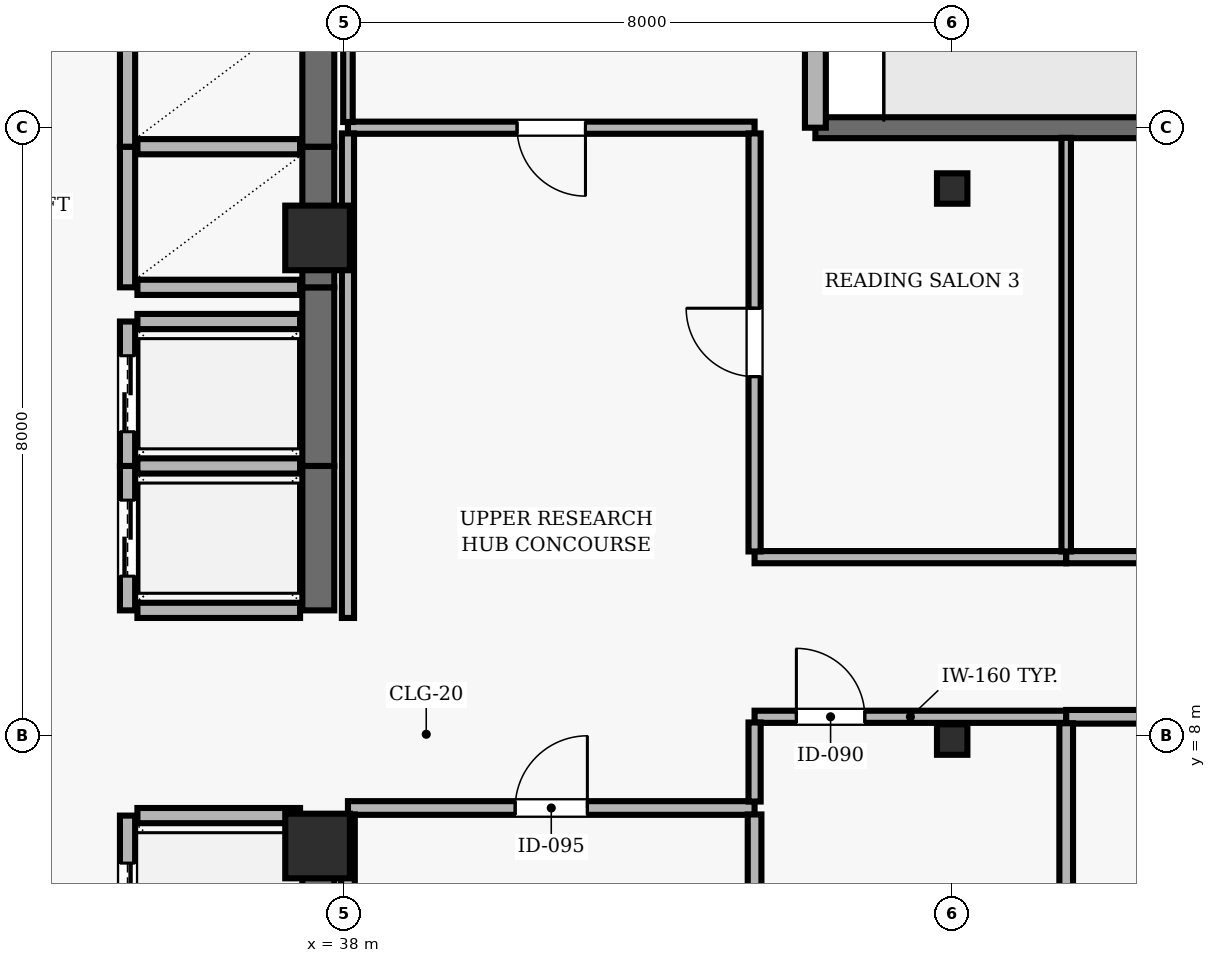
"""IFC4 building model, lengths in metres.
Left out: names, types, materials, properties, quantities, classifications, styles, units other than length and angle.
Written with IfcOpenShell. Run it as: python <this file> out.ifc"""

import sys

from ifc_helpers import new_model, si_unit, direction, frame, frame_2d, origin, origin_2d, place, context, subcontext, project, spatial, rectangle, hollow_rectangle, extrude, element, fill, save


model = new_model("IFC4")
c1 = context("Model", 3, precision=1e-05, world=origin(), true_north=direction((0.0, 1.0)))
c2 = subcontext(c1, "Body", "Model", "MODEL_VIEW")
j1 = project(units=[si_unit("LENGTHUNIT", "METRE"), si_unit("PLANEANGLEUNIT", "RADIAN")], contexts=[c1])
p1 = place(None, origin())
s1 = spatial("IfcSite", under=j1, at=p1, CompositionType="ELEMENT")
p2 = place(p1, origin())
s2 = spatial("IfcBuilding", under=s1, at=p2, CompositionType="ELEMENT")
p3 = place(p2, frame((0.0, 0.0, 275.5)))
s3 = spatial("IfcBuildingStorey", under=s2, at=p3, CompositionType="ELEMENT", Elevation=275.5)
for number, where, z_axis, x_axis in (
    (1, (37.65, 6.55, 0.0), (0.0, 0.0, 1.0), (1.0, 0.0, 0.0)),
    (2, (37.65, 14.55, 0.0), (0.0, 0.0, 1.0), (1.0, 0.0, 0.0)),
):
    element("IfcColumn", number, at=place(p3, frame(where, z_axis=z_axis, x_axis=x_axis)), inside=s3, PredefinedType="COLUMN", context=c2, shape_type="SweptSolid", body=[
        extrude(rectangle(XDim=0.85, YDim=0.85, at=origin_2d()), origin(), (0.0, 0.0, 1.0), 3.9),
    ])
for number, where, z_axis, x_axis in (
    (3, (46.0, 7.95, 0.0), (0.0, 0.0, 1.0), (1.0, 0.0, 0.0)),
    (4, (46.0, 15.2, 0.0), (0.0, 0.0, 1.0), (1.0, 0.0, 0.0)),
):
    element("IfcColumn", number, at=place(p3, frame(where, z_axis=z_axis, x_axis=x_axis)), inside=s3, PredefinedType="COLUMN", context=c2, shape_type="SweptSolid", body=[
        extrude(hollow_rectangle(XDim=0.4, YDim=0.4, WallThickness=0.02, at=origin_2d()), origin(), (0.0, 0.0, 1.0), 3.9),
    ])
p4 = place(p3, frame((57.3, 16.0, 0.0), z_axis=(0.0, 0.0, 1.0), x_axis=(-1.0, 0.0, 0.0)))
e5 = element("IfcWall", 5, at=p4, inside=s3, PredefinedType="SOLIDWALL", context=c2, shape_type="SweptSolid", body=[
    extrude(rectangle(XDim=13.1, YDim=0.275, at=frame_2d((6.55, 0.0))), origin(), (0.0, 0.0, 1.0), 3.69),
])
p5 = place(p4, frame((7.05, 0.0, 0.0)))
e6 = element("IfcOpeningElement", 6, at=p5, cuts=e5, PredefinedType="OPENING", context=c2, shape_type="SweptSolid", body=[
    extrude(rectangle(XDim=1.0, YDim=2.2, at=frame_2d((0.5, 1.1))), frame((0.0, 0.147, 0.0), z_axis=(0.0, -1.0, 0.0), x_axis=(1.0, 0.0, 0.0)), (0.0, 0.0, 1.0), 0.295),
])
p6 = place(p3, frame((44.2, 16.0, 0.0), z_axis=(0.0, 0.0, 1.0), x_axis=(0.0, 1.0, 0.0)))
e7 = element("IfcWall", 7, at=p6, inside=s3, PredefinedType="SOLIDWALL", context=c2, shape_type="SweptSolid", body=[
    extrude(rectangle(XDim=5.4, YDim=0.275, at=frame_2d((2.7, 0.0))), origin(), (0.0, 0.0, 1.0), 3.69),
])
p7 = place(p6, frame((2.1, 0.0, 0.9)))
e8 = element("IfcOpeningElement", 8, at=p7, cuts=e7, PredefinedType="OPENING", context=c2, shape_type="SweptSolid", body=[
    extrude(rectangle(XDim=1.2, YDim=1.6, at=frame_2d((0.6, 0.8))), frame((0.0, 0.147, 0.0), z_axis=(0.0, -1.0, 0.0), x_axis=(1.0, 0.0, 0.0)), (0.0, 0.0, 1.0), 0.295),
])
p8 = place(p3, frame((35.15, 6.95, 0.0), z_axis=(0.0, 0.0, 1.0), x_axis=(0.0, -1.0, 0.0)))
e9 = element("IfcWall", 9, at=p8, inside=s3, PredefinedType="SOLIDWALL", context=c2, shape_type="SweptSolid", body=[
    extrude(rectangle(XDim=2.25, YDim=0.2, at=frame_2d((1.125, 0.0))), origin(), (0.0, 0.0, 1.0), 3.69),
])
p9 = place(p8, frame((0.625, 0.0, 0.0)))
e10 = element("IfcOpeningElement", 10, at=p9, cuts=e9, PredefinedType="OPENING", context=c2, shape_type="SweptSolid", body=[
    extrude(rectangle(XDim=1.0, YDim=2.1, at=frame_2d((0.5, 1.05))), frame((0.0, 0.11, 0.0), z_axis=(0.0, -1.0, 0.0), x_axis=(1.0, 0.0, 0.0)), (0.0, 0.0, 1.0), 0.22),
])
p10 = place(p3, frame((37.66, 4.7, 0.0), z_axis=(0.0, 0.0, 1.0), x_axis=(0.0, 1.0, 0.0)))
e11 = element("IfcWall", 11, at=p10, inside=s3, PredefinedType="SHEAR", context=c2, shape_type="SweptSolid", body=[
    extrude(rectangle(XDim=2.25, YDim=0.42, at=frame_2d((1.125, 0.0))), origin(), (0.0, 0.0, 1.0), 3.69),
])
p11 = place(p3, frame((37.42, 6.95, 0.0), z_axis=(0.0, 0.0, 1.0), x_axis=(-1.0, 0.0, 0.0)))
e12 = element("IfcWall", 12, at=p11, inside=s3, PredefinedType="SOLIDWALL", context=c2, shape_type="SweptSolid", body=[
    extrude(rectangle(XDim=2.14, YDim=0.2, at=frame_2d((1.07, 0.0))), origin(), (0.0, 0.0, 1.0), 3.69),
])
p12 = place(p3, frame((35.15, 11.55, 0.0), z_axis=(0.0, 0.0, 1.0), x_axis=(0.0, -1.0, 0.0)))
e13 = element("IfcWall", 13, at=p12, inside=s3, PredefinedType="SOLIDWALL", context=c2, shape_type="SweptSolid", body=[
    extrude(rectangle(XDim=1.9, YDim=0.2, at=frame_2d((0.95, 0.0))), origin(), (0.0, 0.0, 1.0), 3.69),
])
p13 = place(p12, frame((0.45, 0.0, 0.0)))
e14 = element("IfcOpeningElement", 14, at=p13, cuts=e13, PredefinedType="OPENING", context=c2, shape_type="SweptSolid", body=[
    extrude(rectangle(XDim=1.0, YDim=2.1, at=frame_2d((0.5, 1.05))), frame((0.0, 0.11, 0.0), z_axis=(0.0, -1.0, 0.0), x_axis=(1.0, 0.0, 0.0)), (0.0, 0.0, 1.0), 0.22),
])
p14 = place(p3, frame((37.66, 9.65, 0.0), z_axis=(0.0, 0.0, 1.0), x_axis=(0.0, 1.0, 0.0)))
e15 = element("IfcWall", 15, at=p14, inside=s3, PredefinedType="SHEAR", context=c2, shape_type="SweptSolid", body=[
    extrude(rectangle(XDim=1.9, YDim=0.42, at=frame_2d((0.95, 0.0))), origin(), (0.0, 0.0, 1.0), 3.69),
])
for number, where, z_axis, x_axis in (
    (16, (35.28, 9.65, 0.0), (0.0, 0.0, 1.0), (1.0, 0.0, 0.0)),
    (17, (37.42, 11.55, 0.0), (0.0, 0.0, 1.0), (-1.0, 0.0, 0.0)),
):
    element("IfcWall", number, at=place(p3, frame(where, z_axis=z_axis, x_axis=x_axis)), inside=s3, PredefinedType="SOLIDWALL", context=c2, shape_type="SweptSolid", body=[
        extrude(rectangle(XDim=2.14, YDim=0.2, at=frame_2d((1.07, 0.0))), origin(), (0.0, 0.0, 1.0), 3.69),
    ])
p15 = place(p3, frame((35.15, 13.45, 0.0), z_axis=(0.0, 0.0, 1.0), x_axis=(0.0, -1.0, 0.0)))
e18 = element("IfcWall", 18, at=p15, inside=s3, PredefinedType="SOLIDWALL", context=c2, shape_type="SweptSolid", body=[
    extrude(rectangle(XDim=1.9, YDim=0.2, at=frame_2d((0.95, 0.0))), origin(), (0.0, 0.0, 1.0), 3.69),
])
p16 = place(p15, frame((0.45, 0.0, 0.0)))
e19 = element("IfcOpeningElement", 19, at=p16, cuts=e18, PredefinedType="OPENING", context=c2, shape_type="SweptSolid", body=[
    extrude(rectangle(XDim=1.0, YDim=2.1, at=frame_2d((0.5, 1.05))), frame((0.0, 0.11, 0.0), z_axis=(0.0, -1.0, 0.0), x_axis=(1.0, 0.0, 0.0)), (0.0, 0.0, 1.0), 0.22),
])
p17 = place(p3, frame((37.66, 11.55, 0.0), z_axis=(0.0, 0.0, 1.0), x_axis=(0.0, 1.0, 0.0)))
e20 = element("IfcWall", 20, at=p17, inside=s3, PredefinedType="SHEAR", context=c2, shape_type="SweptSolid", body=[
    extrude(rectangle(XDim=2.35, YDim=0.42, at=frame_2d((1.175, 0.0))), origin(), (0.0, 0.0, 1.0), 3.69),
])
p18 = place(p3, frame((37.42, 13.45, 0.0), z_axis=(0.0, 0.0, 1.0), x_axis=(-1.0, 0.0, 0.0)))
e21 = element("IfcWall", 21, at=p18, inside=s3, PredefinedType="SOLIDWALL", context=c2, shape_type="SweptSolid", body=[
    extrude(rectangle(XDim=2.14, YDim=0.2, at=frame_2d((1.07, 0.0))), origin(), (0.0, 0.0, 1.0), 3.69),
])
p19 = place(p3, frame((35.15, 15.75, 0.0), z_axis=(0.0, 0.0, 1.0), x_axis=(0.0, -1.0, 0.0)))
e22 = element("IfcWall", 22, at=p19, inside=s3, PredefinedType="SOLIDWALL", context=c2, shape_type="SweptSolid", body=[
    extrude(rectangle(XDim=1.85, YDim=0.2, at=frame_2d((0.925, 0.0))), origin(), (0.0, 0.0, 1.0), 3.69),
])
p20 = place(p3, frame((37.66, 13.9, 0.0), z_axis=(0.0, 0.0, 1.0), x_axis=(0.0, 1.0, 0.0)))
e23 = element("IfcWall", 23, at=p20, inside=s3, PredefinedType="SHEAR", context=c2, shape_type="SweptSolid", body=[
    extrude(rectangle(XDim=1.85, YDim=0.42, at=frame_2d((0.925, 0.0))), origin(), (0.0, 0.0, 1.0), 3.69),
])
for number, where, z_axis, x_axis in (
    (24, (35.28, 13.9, 0.0), (0.0, 0.0, 1.0), (1.0, 0.0, 0.0)),
    (25, (37.42, 15.75, 0.0), (0.0, 0.0, 1.0), (-1.0, 0.0, 0.0)),
):
    element("IfcWall", number, at=place(p3, frame(where, z_axis=z_axis, x_axis=x_axis)), inside=s3, PredefinedType="SOLIDWALL", context=c2, shape_type="SweptSolid", body=[
        extrude(rectangle(XDim=2.14, YDim=0.2, at=frame_2d((1.07, 0.0))), origin(), (0.0, 0.0, 1.0), 3.69),
    ])
p21 = place(p3, frame((35.15, 17.6, 0.0), z_axis=(0.0, 0.0, 1.0), x_axis=(0.0, -1.0, 0.0)))
e26 = element("IfcWall", 26, at=p21, inside=s3, PredefinedType="SOLIDWALL", context=c2, shape_type="SweptSolid", body=[
    extrude(rectangle(XDim=1.85, YDim=0.2, at=frame_2d((0.925, 0.0))), origin(), (0.0, 0.0, 1.0), 3.69),
])
p22 = place(p3, frame((37.66, 15.75, 0.0), z_axis=(0.0, 0.0, 1.0), x_axis=(0.0, 1.0, 0.0)))
e27 = element("IfcWall", 27, at=p22, inside=s3, PredefinedType="SHEAR", context=c2, shape_type="SweptSolid", body=[
    extrude(rectangle(XDim=1.85, YDim=0.42, at=frame_2d((0.925, 0.0))), origin(), (0.0, 0.0, 1.0), 3.69),
])
p23 = place(p3, frame((38.05, 7.05, 0.0), z_axis=(0.0, 0.0, 1.0), x_axis=(1.0, 0.0, 0.0)))
e28 = element("IfcWall", 28, at=p23, inside=s3, PredefinedType="PARTITIONING", context=c2, shape_type="SweptSolid", body=[
    extrude(rectangle(XDim=5.35, YDim=0.18, at=frame_2d((2.675, 0.0))), origin(), (0.0, 0.0, 1.0), 3.69),
])
p24 = place(p23, frame((2.2, 0.0, 0.0)))
e29 = element("IfcOpeningElement", 29, at=p24, cuts=e28, PredefinedType="OPENING", context=c2, shape_type="SweptSolid", body=[
    extrude(rectangle(XDim=0.95, YDim=2.1, at=frame_2d((0.475, 1.05))), frame((0.0, 0.1, 0.0), z_axis=(0.0, -1.0, 0.0), x_axis=(1.0, 0.0, 0.0)), (0.0, 0.0, 1.0), 0.2),
])
p25 = place(p3, frame((43.4, 8.25, 0.0), z_axis=(0.0, 0.0, 1.0), x_axis=(1.0, 0.0, 0.0)))
e30 = element("IfcWall", 30, at=p25, inside=s3, PredefinedType="PARTITIONING", context=c2, shape_type="SweptSolid", body=[
    extrude(rectangle(XDim=4.1, YDim=0.16, at=frame_2d((2.05, 0.0))), origin(), (0.0, 0.0, 1.0), 3.227),
])
p26 = place(p25, frame((0.55, 0.0, 0.0)))
e31 = element("IfcOpeningElement", 31, at=p26, cuts=e30, PredefinedType="OPENING", context=c2, shape_type="SweptSolid", body=[
    extrude(rectangle(XDim=0.9, YDim=2.1, at=frame_2d((0.45, 1.05))), frame((0.0, 0.09, 0.0), z_axis=(0.0, -1.0, 0.0), x_axis=(1.0, 0.0, 0.0)), (0.0, 0.0, 1.0), 0.18),
])
p27 = place(p3, frame((43.4, 16.0, 0.0), z_axis=(0.0, 0.0, 1.0), x_axis=(-1.0, 0.0, 0.0)))
e32 = element("IfcWall", 32, at=p27, inside=s3, PredefinedType="PARTITIONING", context=c2, shape_type="SweptSolid", body=[
    extrude(rectangle(XDim=5.35, YDim=0.16, at=frame_2d((2.675, 0.0))), origin(), (0.0, 0.0, 1.0), 3.39),
])
p28 = place(p27, frame((2.225, 0.0, 0.0)))
e33 = element("IfcOpeningElement", 33, at=p28, cuts=e32, PredefinedType="OPENING", context=c2, shape_type="SweptSolid", body=[
    extrude(rectangle(XDim=0.9, YDim=2.1, at=frame_2d((0.45, 1.05))), frame((0.0, 0.09, 0.0), z_axis=(0.0, -1.0, 0.0), x_axis=(1.0, 0.0, 0.0)), (0.0, 0.0, 1.0), 0.18),
])
p29 = place(p3, frame((47.5, 8.25, 0.0), z_axis=(0.0, 0.0, 1.0), x_axis=(1.0, 0.0, 0.0)))
e34 = element("IfcWall", 34, at=p29, inside=s3, PredefinedType="PARTITIONING", context=c2, shape_type="SweptSolid", body=[
    extrude(rectangle(XDim=4.5, YDim=0.18, at=frame_2d((2.25, 0.0))), origin(), (0.0, 0.0, 1.0), 3.227),
])
p30 = place(p29, frame((1.775, 0.0, 0.0)))
e35 = element("IfcOpeningElement", 35, at=p30, cuts=e34, PredefinedType="OPENING", context=c2, shape_type="SweptSolid", body=[
    extrude(rectangle(XDim=0.95, YDim=2.1, at=frame_2d((0.475, 1.05))), frame((0.0, 0.1, 0.0), z_axis=(0.0, -1.0, 0.0), x_axis=(1.0, 0.0, 0.0)), (0.0, 0.0, 1.0), 0.2),
])
p31 = place(p3, frame((47.5, 10.35, 0.0), z_axis=(0.0, 0.0, 1.0), x_axis=(-1.0, 0.0, 0.0)))
e36 = element("IfcWall", 36, at=p31, inside=s3, PredefinedType="PARTITIONING", context=c2, shape_type="SweptSolid", body=[
    extrude(rectangle(XDim=4.1, YDim=0.16, at=frame_2d((2.05, 0.0))), origin(), (0.0, 0.0, 1.0), 3.424),
])
p32 = place(p3, frame((52.0, 10.35, 0.0), z_axis=(0.0, 0.0, 1.0), x_axis=(-1.0, 0.0, 0.0)))
e37 = element("IfcWall", 37, at=p32, inside=s3, PredefinedType="PARTITIONING", context=c2, shape_type="SweptSolid", body=[
    extrude(rectangle(XDim=4.5, YDim=0.16, at=frame_2d((2.25, 0.0))), origin(), (0.0, 0.0, 1.0), 3.424),
])
p33 = place(p32, frame((1.8, 0.0, 0.0)))
e38 = element("IfcOpeningElement", 38, at=p33, cuts=e37, PredefinedType="OPENING", context=c2, shape_type="SweptSolid", body=[
    extrude(rectangle(XDim=0.9, YDim=2.1, at=frame_2d((0.45, 1.05))), frame((0.0, 0.09, 0.0), z_axis=(0.0, -1.0, 0.0), x_axis=(1.0, 0.0, 0.0)), (0.0, 0.0, 1.0), 0.18),
])
p34 = place(p3, frame((38.05, 6.965, 0.0), z_axis=(0.0, 0.0, 1.0), x_axis=(0.0, -1.0, 0.0)))
e39 = element("IfcWall", 39, at=p34, inside=s3, PredefinedType="PARTITIONING", context=c2, shape_type="SweptSolid", body=[
    extrude(rectangle(XDim=6.832, YDim=0.18, at=frame_2d((3.416, 0.0))), origin(), (0.0, 0.0, 1.0), 3.227),
])
p35 = place(p3, frame((38.05, 15.925, 0.0), z_axis=(0.0, 0.0, 1.0), x_axis=(0.0, -1.0, 0.0)))
e40 = element("IfcWall", 40, at=p35, inside=s3, PredefinedType="PARTITIONING", context=c2, shape_type="SweptSolid", body=[
    extrude(rectangle(XDim=6.375, YDim=0.16, at=frame_2d((3.188, 0.0))), origin(), (0.0, 0.0, 1.0), 3.227),
])
p36 = place(p3, frame((38.05, 22.468, 0.0), z_axis=(0.0, 0.0, 1.0), x_axis=(0.0, -1.0, 0.0)))
e41 = element("IfcWall", 41, at=p36, inside=s3, PredefinedType="PARTITIONING", context=c2, shape_type="SweptSolid", body=[
    extrude(rectangle(XDim=6.393, YDim=0.125, at=frame_2d((3.197, 0.0))), origin(), (0.0, 0.0, 1.0), 3.227),
])
p37 = place(p3, frame((43.4, 0.133, 0.0), z_axis=(0.0, 0.0, 1.0), x_axis=(0.0, 1.0, 0.0)))
e42 = element("IfcWall", 42, at=p37, inside=s3, PredefinedType="PARTITIONING", context=c2, shape_type="SweptSolid", body=[
    extrude(rectangle(XDim=6.832, YDim=0.18, at=frame_2d((3.416, 0.0))), origin(), (0.0, 0.0, 1.0), 3.69),
])
p38 = place(p3, frame((43.4, 7.135, 0.0), z_axis=(0.0, 0.0, 1.0), x_axis=(0.0, 1.0, 0.0)))
e43 = element("IfcWall", 43, at=p38, inside=s3, PredefinedType="PARTITIONING", context=c2, shape_type="SweptSolid", body=[
    extrude(rectangle(XDim=1.04, YDim=0.16, at=frame_2d((0.52, 0.0))), origin(), (0.0, 0.0, 1.0), 3.69),
])
p39 = place(p3, frame((43.4, 10.425, 0.0), z_axis=(0.0, 0.0, 1.0), x_axis=(0.0, 1.0, 0.0)))
e44 = element("IfcWall", 44, at=p39, inside=s3, PredefinedType="PARTITIONING", context=c2, shape_type="SweptSolid", body=[
    extrude(rectangle(XDim=5.5, YDim=0.16, at=frame_2d((2.75, 0.0))), origin(), (0.0, 0.0, 1.0), 3.69),
])
p40 = place(p39, frame((2.3, 0.0, 0.0)))
e45 = element("IfcOpeningElement", 45, at=p40, cuts=e44, PredefinedType="OPENING", context=c2, shape_type="SweptSolid", body=[
    extrude(rectangle(XDim=0.9, YDim=2.1, at=frame_2d((0.45, 1.05))), frame((0.0, 0.09, 0.0), z_axis=(0.0, -1.0, 0.0), x_axis=(1.0, 0.0, 0.0)), (0.0, 0.0, 1.0), 0.18),
])
p41 = place(p3, frame((47.5, 0.133, 0.0), z_axis=(0.0, 0.0, 1.0), x_axis=(0.0, 1.0, 0.0)))
e46 = element("IfcWall", 46, at=p41, inside=s3, PredefinedType="PARTITIONING", context=c2, shape_type="SweptSolid", body=[
    extrude(rectangle(XDim=8.032, YDim=0.18, at=frame_2d((4.016, 0.0))), origin(), (0.0, 0.0, 1.0), 3.69),
])
p42 = place(p3, frame((47.5, 10.425, 0.0), z_axis=(0.0, 0.0, 1.0), x_axis=(0.0, 1.0, 0.0)))
e47 = element("IfcWall", 47, at=p42, inside=s3, PredefinedType="PARTITIONING", context=c2, shape_type="SweptSolid", body=[
    extrude(rectangle(XDim=5.442, YDim=0.125, at=frame_2d((2.721, 0.0))), origin(), (0.0, 0.0, 1.0), 3.69),
])
p43 = place(p9, origin())
e48 = element("IfcDoor", 48, at=p43, inside=s3, OperationType="DOUBLE_DOOR_SLIDING", PredefinedType="DOOR", context=c2, shape_type="SweptSolid", body=[
    extrude(rectangle(XDim=1.0, YDim=2.1, at=frame_2d((0.5, 1.05))), frame((0.0, 0.025, 0.0), z_axis=(0.0, -1.0, 0.0), x_axis=(1.0, 0.0, 0.0)), (0.0, 0.0, 1.0), 0.05),
])
fill(e10, e48)
p44 = place(p13, origin())
e49 = element("IfcDoor", 49, at=p44, inside=s3, OperationType="DOUBLE_DOOR_SLIDING", PredefinedType="DOOR", context=c2, shape_type="SweptSolid", body=[
    extrude(rectangle(XDim=1.0, YDim=2.1, at=frame_2d((0.5, 1.05))), frame((0.0, 0.025, 0.0), z_axis=(0.0, -1.0, 0.0), x_axis=(1.0, 0.0, 0.0)), (0.0, 0.0, 1.0), 0.05),
])
fill(e14, e49)
p45 = place(p16, origin())
e50 = element("IfcDoor", 50, at=p45, inside=s3, OperationType="DOUBLE_DOOR_SLIDING", PredefinedType="DOOR", context=c2, shape_type="SweptSolid", body=[
    extrude(rectangle(XDim=1.0, YDim=2.1, at=frame_2d((0.5, 1.05))), frame((0.0, 0.025, 0.0), z_axis=(0.0, -1.0, 0.0), x_axis=(1.0, 0.0, 0.0)), (0.0, 0.0, 1.0), 0.05),
])
fill(e19, e50)
p46 = place(p24, origin())
e51 = element("IfcDoor", 51, at=p46, inside=s3, OperationType="SINGLE_SWING_RIGHT", PredefinedType="DOOR", context=c2, shape_type="SweptSolid", body=[
    extrude(rectangle(XDim=0.95, YDim=2.1, at=frame_2d((0.475, 1.05))), frame((0.0, 0.025, 0.0), z_axis=(0.0, -1.0, 0.0), x_axis=(1.0, 0.0, 0.0)), (0.0, 0.0, 1.0), 0.05),
])
fill(e29, e51)
p47 = place(p26, origin())
e52 = element("IfcDoor", 52, at=p47, inside=s3, OperationType="SINGLE_SWING_LEFT", PredefinedType="DOOR", context=c2, shape_type="SweptSolid", body=[
    extrude(rectangle(XDim=0.9, YDim=2.1, at=frame_2d((0.45, 1.05))), frame((0.0, 0.025, 0.0), z_axis=(0.0, -1.0, 0.0), x_axis=(1.0, 0.0, 0.0)), (0.0, 0.0, 1.0), 0.05),
])
fill(e31, e52)
p48 = place(p40, origin())
e53 = element("IfcDoor", 53, at=p48, inside=s3, OperationType="SINGLE_SWING_RIGHT", PredefinedType="DOOR", context=c2, shape_type="SweptSolid", body=[
    extrude(rectangle(XDim=0.9, YDim=2.1, at=frame_2d((0.45, 1.05))), frame((0.0, 0.025, 0.0), z_axis=(0.0, -1.0, 0.0), x_axis=(1.0, 0.0, 0.0)), (0.0, 0.0, 1.0), 0.05),
])
fill(e45, e53)
p49 = place(p28, origin())
e54 = element("IfcDoor", 54, at=p49, inside=s3, OperationType="SINGLE_SWING_LEFT", PredefinedType="DOOR", context=c2, shape_type="SweptSolid", body=[
    extrude(rectangle(XDim=0.9, YDim=2.1, at=frame_2d((0.45, 1.05))), frame((0.0, 0.025, 0.0), z_axis=(0.0, -1.0, 0.0), x_axis=(1.0, 0.0, 0.0)), (0.0, 0.0, 1.0), 0.05),
])
fill(e33, e54)
save(model, sys.argv[1])
